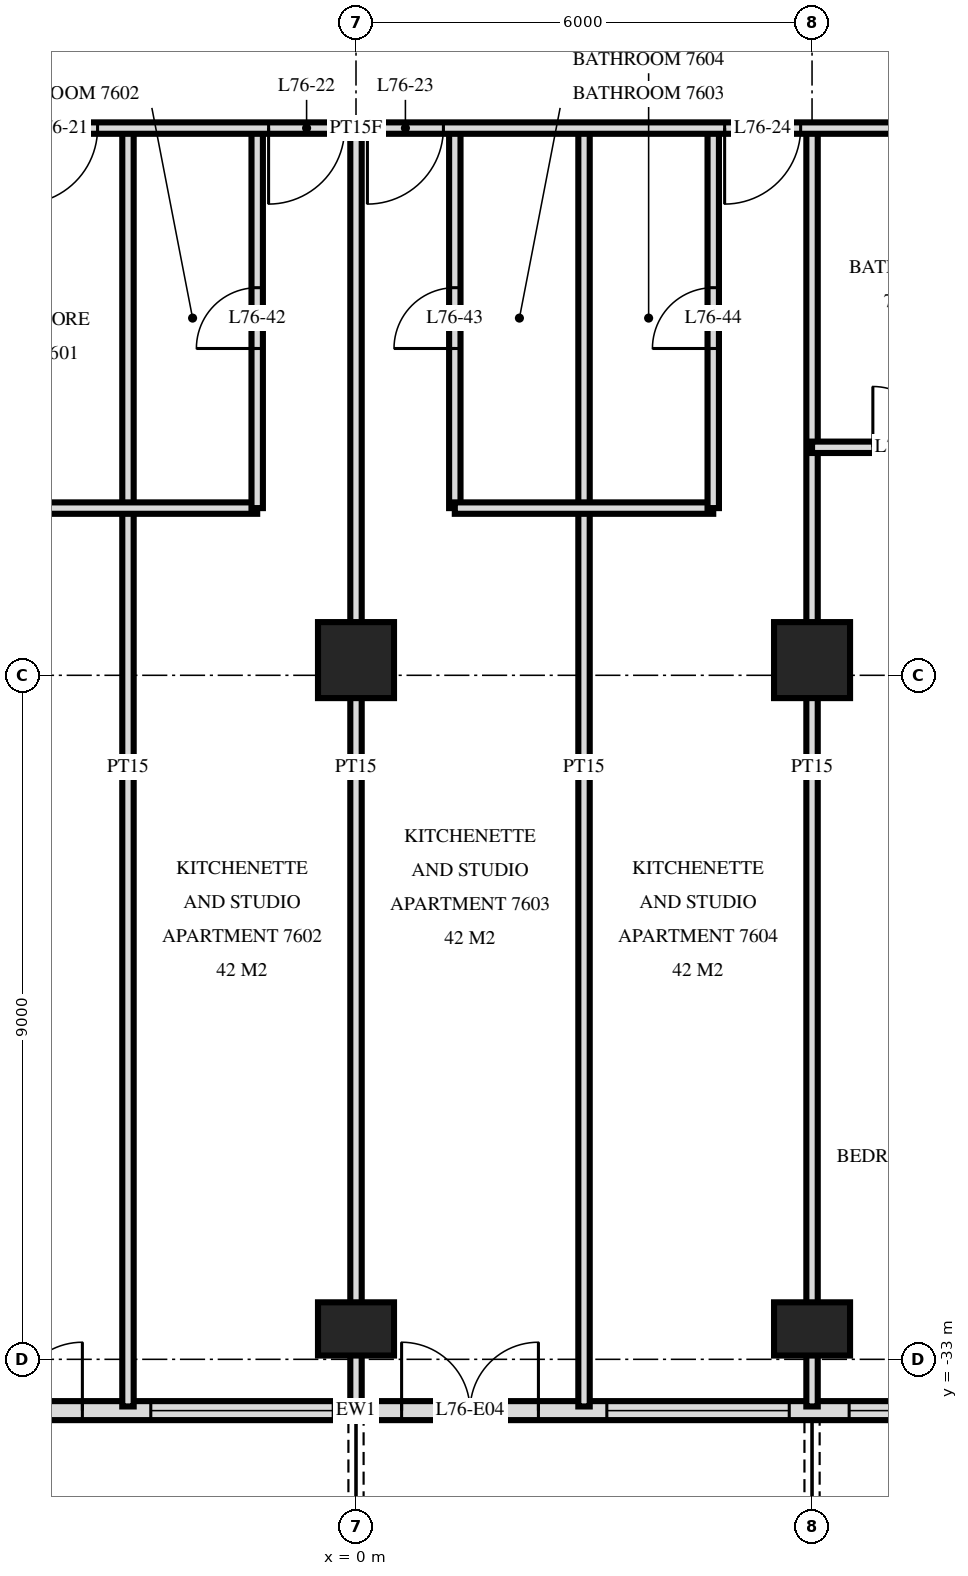
"""IFC4 building model, lengths in metres.
Left out: names, types, materials, properties, quantities, classifications, styles, units other than length and angle.
Written with IfcOpenShell. Run it as: python <this file> out.ifc"""

import sys

from ifc_helpers import new_model, si_unit, direction, frame, frame_2d, origin, origin_2d, place, context, subcontext, project, spatial, rectangle, extrude, element, fill, save


model = new_model("IFC4")
c1 = context("Model", 3, precision=1e-05, world=origin(), true_north=direction((0.0, 1.0)))
c2 = subcontext(c1, "Body", "Model", "MODEL_VIEW")
j1 = project(units=[si_unit("LENGTHUNIT", "METRE"), si_unit("PLANEANGLEUNIT", "RADIAN")], contexts=[c1])
p1 = place(None, origin())
s1 = spatial("IfcSite", under=j1, at=p1, CompositionType="ELEMENT")
p2 = place(p1, origin())
s2 = spatial("IfcBuilding", under=s1, at=p2, CompositionType="ELEMENT")
p3 = place(p2, frame((0.0, 0.0, 287.6)))
s3 = spatial("IfcBuildingStorey", under=s2, at=p3, CompositionType="ELEMENT", Elevation=287.6)
p4 = place(p3, frame((0.0, -32.6, 0.0), z_axis=(0.0, 0.0, 1.0), x_axis=(1.0, 0.0, 0.0)))
e1 = element("IfcColumn", 1, at=p4, inside=s3, PredefinedType="COLUMN", context=c2, shape_type="SweptSolid", body=[
    extrude(rectangle(XDim=1.0, YDim=0.7, at=origin_2d()), origin(), (0.0, 0.0, 1.0), 3.5),
])
p5 = place(p3, frame((0.0, -23.8, 0.0), z_axis=(0.0, 0.0, 1.0), x_axis=(1.0, 0.0, 0.0)))
e2 = element("IfcColumn", 2, at=p5, inside=s3, PredefinedType="COLUMN", context=c2, shape_type="SweptSolid", body=[
    extrude(rectangle(XDim=1.0, YDim=1.0, at=origin_2d()), origin(), (0.0, 0.0, 1.0), 3.5),
])
p6 = place(p3, frame((6.0, -32.6, 0.0), z_axis=(0.0, 0.0, 1.0), x_axis=(1.0, 0.0, 0.0)))
e3 = element("IfcColumn", 3, at=p6, inside=s3, PredefinedType="COLUMN", context=c2, shape_type="SweptSolid", body=[
    extrude(rectangle(XDim=1.0, YDim=0.7, at=origin_2d()), origin(), (0.0, 0.0, 1.0), 3.5),
])
p7 = place(p3, frame((6.0, -23.8, 0.0), z_axis=(0.0, 0.0, 1.0), x_axis=(1.0, 0.0, 0.0)))
e4 = element("IfcColumn", 4, at=p7, inside=s3, PredefinedType="COLUMN", context=c2, shape_type="SweptSolid", body=[
    extrude(rectangle(XDim=1.0, YDim=1.0, at=origin_2d()), origin(), (0.0, 0.0, 1.0), 3.5),
])
p8 = place(p3, frame((-18.575, -33.675, 0.0), z_axis=(0.0, 0.0, 1.0), x_axis=(1.0, 0.0, 0.0)))
e5 = element("IfcWall", 5, at=p8, inside=s3, PredefinedType="SOLIDWALL", context=c2, shape_type="SweptSolid", body=[
    extrude(rectangle(XDim=37.151, YDim=0.25, at=frame_2d((18.575, 0.0))), origin(), (0.0, 0.0, 1.0), 3.22),
])
p9 = place(p8, frame((1.175, 0.0, 0.0)))
e6 = element("IfcOpeningElement", 6, at=p9, cuts=e5, PredefinedType="OPENING", context=c2, shape_type="SweptSolid", body=[
    extrude(rectangle(XDim=1.8, YDim=2.4, at=frame_2d((0.9, 1.2))), frame((0.0, 0.135, 0.0), z_axis=(0.0, -1.0, 0.0), x_axis=(1.0, 0.0, 0.0)), (0.0, 0.0, 1.0), 0.27),
])
p10 = place(p8, frame((4.4, 0.0, 0.9)))
e7 = element("IfcOpeningElement", 7, at=p10, cuts=e5, PredefinedType="OPENING", context=c2, shape_type="SweptSolid", body=[
    extrude(rectangle(XDim=1.8, YDim=1.5, at=frame_2d((0.9, 0.75))), frame((0.0, 0.135, 0.0), z_axis=(0.0, -1.0, 0.0), x_axis=(1.0, 0.0, 0.0)), (0.0, 0.0, 1.0), 0.27),
])
p11 = place(p8, frame((6.875, 0.0, 0.9)))
e8 = element("IfcOpeningElement", 8, at=p11, cuts=e5, PredefinedType="OPENING", context=c2, shape_type="SweptSolid", body=[
    extrude(rectangle(XDim=2.4, YDim=1.5, at=frame_2d((1.2, 0.75))), frame((0.0, 0.135, 0.0), z_axis=(0.0, -1.0, 0.0), x_axis=(1.0, 0.0, 0.0)), (0.0, 0.0, 1.0), 0.27),
])
p12 = place(p8, frame((10.175, 0.0, 0.0)))
e9 = element("IfcOpeningElement", 9, at=p12, cuts=e5, PredefinedType="OPENING", context=c2, shape_type="SweptSolid", body=[
    extrude(rectangle(XDim=1.8, YDim=2.4, at=frame_2d((0.9, 1.2))), frame((0.0, 0.135, 0.0), z_axis=(0.0, -1.0, 0.0), x_axis=(1.0, 0.0, 0.0)), (0.0, 0.0, 1.0), 0.27),
])
p13 = place(p8, frame((13.175, 0.0, 0.0)))
e10 = element("IfcOpeningElement", 10, at=p13, cuts=e5, PredefinedType="OPENING", context=c2, shape_type="SweptSolid", body=[
    extrude(rectangle(XDim=1.8, YDim=2.4, at=frame_2d((0.9, 1.2))), frame((0.0, 0.135, 0.0), z_axis=(0.0, -1.0, 0.0), x_axis=(1.0, 0.0, 0.0)), (0.0, 0.0, 1.0), 0.27),
])
p14 = place(p8, frame((15.875, 0.0, 0.9)))
e11 = element("IfcOpeningElement", 11, at=p14, cuts=e5, PredefinedType="OPENING", context=c2, shape_type="SweptSolid", body=[
    extrude(rectangle(XDim=2.4, YDim=1.5, at=frame_2d((1.2, 0.75))), frame((0.0, 0.135, 0.0), z_axis=(0.0, -1.0, 0.0), x_axis=(1.0, 0.0, 0.0)), (0.0, 0.0, 1.0), 0.27),
])
p15 = place(p8, frame((19.175, 0.0, 0.0)))
e12 = element("IfcOpeningElement", 12, at=p15, cuts=e5, PredefinedType="OPENING", context=c2, shape_type="SweptSolid", body=[
    extrude(rectangle(XDim=1.8, YDim=2.4, at=frame_2d((0.9, 1.2))), frame((0.0, 0.135, 0.0), z_axis=(0.0, -1.0, 0.0), x_axis=(1.0, 0.0, 0.0)), (0.0, 0.0, 1.0), 0.27),
])
p16 = place(p8, frame((21.875, 0.0, 0.9)))
e13 = element("IfcOpeningElement", 13, at=p16, cuts=e5, PredefinedType="OPENING", context=c2, shape_type="SweptSolid", body=[
    extrude(rectangle(XDim=2.4, YDim=1.5, at=frame_2d((1.2, 0.75))), frame((0.0, 0.135, 0.0), z_axis=(0.0, -1.0, 0.0), x_axis=(1.0, 0.0, 0.0)), (0.0, 0.0, 1.0), 0.27),
])
p17 = place(p8, frame((25.063, 0.0, 0.9)))
e14 = element("IfcOpeningElement", 14, at=p17, cuts=e5, PredefinedType="OPENING", context=c2, shape_type="SweptSolid", body=[
    extrude(rectangle(XDim=1.8, YDim=1.5, at=frame_2d((0.9, 0.75))), frame((0.0, 0.135, 0.0), z_axis=(0.0, -1.0, 0.0), x_axis=(1.0, 0.0, 0.0)), (0.0, 0.0, 1.0), 0.27),
])
p18 = place(p8, frame((27.838, 0.0, 0.0)))
e15 = element("IfcOpeningElement", 15, at=p18, cuts=e5, PredefinedType="OPENING", context=c2, shape_type="SweptSolid", body=[
    extrude(rectangle(XDim=1.8, YDim=2.4, at=frame_2d((0.9, 1.2))), frame((0.0, 0.135, 0.0), z_axis=(0.0, -1.0, 0.0), x_axis=(1.0, 0.0, 0.0)), (0.0, 0.0, 1.0), 0.27),
])
p19 = place(p8, frame((31.175, 0.0, 0.0)))
e16 = element("IfcOpeningElement", 16, at=p19, cuts=e5, PredefinedType="OPENING", context=c2, shape_type="SweptSolid", body=[
    extrude(rectangle(XDim=1.8, YDim=2.4, at=frame_2d((0.9, 1.2))), frame((0.0, 0.135, 0.0), z_axis=(0.0, -1.0, 0.0), x_axis=(1.0, 0.0, 0.0)), (0.0, 0.0, 1.0), 0.27),
])
p20 = place(p3, frame((6.0, -33.62, 0.0), z_axis=(0.0, 0.0, 1.0), x_axis=(0.0, 1.0, 0.0)))
e17 = element("IfcWall", 17, at=p20, inside=s3, PredefinedType="PARTITIONING", context=c2, shape_type="SweptSolid", body=[
    extrude(rectangle(XDim=16.82, YDim=0.15, at=frame_2d((8.41, 0.0))), origin(), (0.0, 0.0, 1.0), 3.22),
])
p21 = place(p3, frame((4.7, -21.8, 0.0), z_axis=(0.0, 0.0, 1.0), x_axis=(0.0, 1.0, 0.0)))
e18 = element("IfcWall", 18, at=p21, inside=s3, PredefinedType="PARTITIONING", context=c2, shape_type="SweptSolid", body=[
    extrude(rectangle(XDim=5.0, YDim=0.15, at=frame_2d((2.5, 0.0))), origin(), (0.0, 0.0, 1.0), 3.22),
])
p22 = place(p21, frame((2.1, 0.0, 0.0)))
e19 = element("IfcOpeningElement", 19, at=p22, cuts=e18, PredefinedType="OPENING", context=c2, shape_type="SweptSolid", body=[
    extrude(rectangle(XDim=0.8, YDim=2.1, at=frame_2d((0.4, 1.05))), frame((0.0, 0.085, 0.0), z_axis=(0.0, -1.0, 0.0), x_axis=(1.0, 0.0, 0.0)), (0.0, 0.0, 1.0), 0.17),
])
p23 = place(p3, frame((3.0, -33.62, 0.0), z_axis=(0.0, 0.0, 1.0), x_axis=(0.0, 1.0, 0.0)))
e20 = element("IfcWall", 20, at=p23, inside=s3, PredefinedType="PARTITIONING", context=c2, shape_type="SweptSolid", body=[
    extrude(rectangle(XDim=16.82, YDim=0.15, at=frame_2d((8.41, 0.0))), origin(), (0.0, 0.0, 1.0), 3.22),
])
p24 = place(p3, frame((1.3, -21.8, 0.0), z_axis=(0.0, 0.0, 1.0), x_axis=(0.0, 1.0, 0.0)))
e21 = element("IfcWall", 21, at=p24, inside=s3, PredefinedType="PARTITIONING", context=c2, shape_type="SweptSolid", body=[
    extrude(rectangle(XDim=5.0, YDim=0.15, at=frame_2d((2.5, 0.0))), origin(), (0.0, 0.0, 1.0), 3.22),
])
p25 = place(p24, frame((2.1, 0.0, 0.0)))
e22 = element("IfcOpeningElement", 22, at=p25, cuts=e21, PredefinedType="OPENING", context=c2, shape_type="SweptSolid", body=[
    extrude(rectangle(XDim=0.8, YDim=2.1, at=frame_2d((0.4, 1.05))), frame((0.0, 0.085, 0.0), z_axis=(0.0, -1.0, 0.0), x_axis=(1.0, 0.0, 0.0)), (0.0, 0.0, 1.0), 0.17),
])
p26 = place(p3, frame((0.0, -33.62, 0.0), z_axis=(0.0, 0.0, 1.0), x_axis=(0.0, 1.0, 0.0)))
e23 = element("IfcWall", 23, at=p26, inside=s3, PredefinedType="PARTITIONING", context=c2, shape_type="SweptSolid", body=[
    extrude(rectangle(XDim=16.82, YDim=0.15, at=frame_2d((8.41, 0.0))), origin(), (0.0, 0.0, 1.0), 3.22),
])
p27 = place(p3, frame((-1.3, -21.8, 0.0), z_axis=(0.0, 0.0, 1.0), x_axis=(0.0, 1.0, 0.0)))
e24 = element("IfcWall", 24, at=p27, inside=s3, PredefinedType="PARTITIONING", context=c2, shape_type="SweptSolid", body=[
    extrude(rectangle(XDim=5.0, YDim=0.15, at=frame_2d((2.5, 0.0))), origin(), (0.0, 0.0, 1.0), 3.22),
])
p28 = place(p27, frame((2.1, 0.0, 0.0)))
e25 = element("IfcOpeningElement", 25, at=p28, cuts=e24, PredefinedType="OPENING", context=c2, shape_type="SweptSolid", body=[
    extrude(rectangle(XDim=0.8, YDim=2.1, at=frame_2d((0.4, 1.05))), frame((0.0, 0.085, 0.0), z_axis=(0.0, -1.0, 0.0), x_axis=(1.0, 0.0, 0.0)), (0.0, 0.0, 1.0), 0.17),
])
p29 = place(p3, frame((-3.0, -33.62, 0.0), z_axis=(0.0, 0.0, 1.0), x_axis=(0.0, 1.0, 0.0)))
e26 = element("IfcWall", 26, at=p29, inside=s3, PredefinedType="PARTITIONING", context=c2, shape_type="SweptSolid", body=[
    extrude(rectangle(XDim=16.82, YDim=0.15, at=frame_2d((8.41, 0.0))), origin(), (0.0, 0.0, 1.0), 3.22),
])
p30 = place(p3, frame((-4.8, -21.8, 0.0), z_axis=(0.0, 0.0, 1.0), x_axis=(1.0, 0.0, 0.0)))
e27 = element("IfcWall", 27, at=p30, inside=s3, PredefinedType="PARTITIONING", context=c2, shape_type="SweptSolid", body=[
    extrude(rectangle(XDim=3.5, YDim=0.15, at=frame_2d((1.75, 0.0))), origin(), (0.0, 0.0, 1.0), 3.22),
])
p31 = place(p3, frame((1.3, -21.8, 0.0), z_axis=(0.0, 0.0, 1.0), x_axis=(1.0, 0.0, 0.0)))
e28 = element("IfcWall", 28, at=p31, inside=s3, PredefinedType="PARTITIONING", context=c2, shape_type="SweptSolid", body=[
    extrude(rectangle(XDim=3.4, YDim=0.15, at=frame_2d((1.7, 0.0))), origin(), (0.0, 0.0, 1.0), 3.22),
])
p32 = place(p3, frame((6.0, -21.0, 0.0), z_axis=(0.0, 0.0, 1.0), x_axis=(1.0, 0.0, 0.0)))
e29 = element("IfcWall", 29, at=p32, inside=s3, PredefinedType="PARTITIONING", context=c2, shape_type="SweptSolid", body=[
    extrude(rectangle(XDim=6.0, YDim=0.15, at=frame_2d((3.0, 0.0))), origin(), (0.0, 0.0, 1.0), 3.22),
])
p33 = place(p32, frame((0.8, 0.0, 0.0)))
e30 = element("IfcOpeningElement", 30, at=p33, cuts=e29, PredefinedType="OPENING", context=c2, shape_type="SweptSolid", body=[
    extrude(rectangle(XDim=0.8, YDim=2.1, at=frame_2d((0.4, 1.05))), frame((0.0, 0.085, 0.0), z_axis=(0.0, -1.0, 0.0), x_axis=(1.0, 0.0, 0.0)), (0.0, 0.0, 1.0), 0.17),
])
p34 = place(p3, frame((-22.92, -16.8, 0.0), z_axis=(0.0, 0.0, 1.0), x_axis=(1.0, 0.0, 0.0)))
e31 = element("IfcWall", 31, at=p34, inside=s3, PredefinedType="PARTITIONING", context=c2, shape_type="SweptSolid", body=[
    extrude(rectangle(XDim=45.84, YDim=0.15, at=frame_2d((22.92, 0.0))), origin(), (0.0, 0.0, 1.0), 3.22),
])
p35 = place(p34, frame((16.72, 0.0, 0.0)))
e32 = element("IfcOpeningElement", 32, at=p35, cuts=e31, PredefinedType="OPENING", context=c2, shape_type="SweptSolid", body=[
    extrude(rectangle(XDim=1.0, YDim=2.1, at=frame_2d((0.5, 1.05))), frame((0.0, 0.085, 0.0), z_axis=(0.0, -1.0, 0.0), x_axis=(1.0, 0.0, 0.0)), (0.0, 0.0, 1.0), 0.17),
])
p36 = place(p34, frame((18.52, 0.0, 0.0)))
e33 = element("IfcOpeningElement", 33, at=p36, cuts=e31, PredefinedType="OPENING", context=c2, shape_type="SweptSolid", body=[
    extrude(rectangle(XDim=1.0, YDim=2.1, at=frame_2d((0.5, 1.05))), frame((0.0, 0.085, 0.0), z_axis=(0.0, -1.0, 0.0), x_axis=(1.0, 0.0, 0.0)), (0.0, 0.0, 1.0), 0.17),
])
p37 = place(p34, frame((21.77, 0.0, 0.0)))
e34 = element("IfcOpeningElement", 34, at=p37, cuts=e31, PredefinedType="OPENING", context=c2, shape_type="SweptSolid", body=[
    extrude(rectangle(XDim=1.0, YDim=2.1, at=frame_2d((0.5, 1.05))), frame((0.0, 0.085, 0.0), z_axis=(0.0, -1.0, 0.0), x_axis=(1.0, 0.0, 0.0)), (0.0, 0.0, 1.0), 0.17),
])
p38 = place(p34, frame((23.07, 0.0, 0.0)))
e35 = element("IfcOpeningElement", 35, at=p38, cuts=e31, PredefinedType="OPENING", context=c2, shape_type="SweptSolid", body=[
    extrude(rectangle(XDim=1.0, YDim=2.1, at=frame_2d((0.5, 1.05))), frame((0.0, 0.085, 0.0), z_axis=(0.0, -1.0, 0.0), x_axis=(1.0, 0.0, 0.0)), (0.0, 0.0, 1.0), 0.17),
])
p39 = place(p34, frame((27.77, 0.0, 0.0)))
e36 = element("IfcOpeningElement", 36, at=p39, cuts=e31, PredefinedType="OPENING", context=c2, shape_type="SweptSolid", body=[
    extrude(rectangle(XDim=1.0, YDim=2.1, at=frame_2d((0.5, 1.05))), frame((0.0, 0.085, 0.0), z_axis=(0.0, -1.0, 0.0), x_axis=(1.0, 0.0, 0.0)), (0.0, 0.0, 1.0), 0.17),
])
p40 = place(p34, frame((7.02, 0.0, 0.0)))
e37 = element("IfcOpeningElement", 37, at=p40, cuts=e31, PredefinedType="OPENING", context=c2, shape_type="SweptSolid", body=[
    extrude(rectangle(XDim=1.0, YDim=2.1, at=frame_2d((0.5, 1.05))), frame((0.0, 0.085, 0.0), z_axis=(0.0, -1.0, 0.0), x_axis=(1.0, 0.0, 0.0)), (0.0, 0.0, 1.0), 0.17),
])
p41 = place(p34, frame((35.42, 0.0, 0.0)))
e38 = element("IfcOpeningElement", 38, at=p41, cuts=e31, PredefinedType="OPENING", context=c2, shape_type="SweptSolid", body=[
    extrude(rectangle(XDim=1.0, YDim=2.1, at=frame_2d((0.5, 1.05))), frame((0.0, 0.085, 0.0), z_axis=(0.0, -1.0, 0.0), x_axis=(1.0, 0.0, 0.0)), (0.0, 0.0, 1.0), 0.17),
])
p42 = place(p34, frame((42.19, 0.0, 0.0)))
e39 = element("IfcOpeningElement", 39, at=p42, cuts=e31, PredefinedType="OPENING", context=c2, shape_type="SweptSolid", body=[
    extrude(rectangle(XDim=1.0, YDim=2.1, at=frame_2d((0.5, 1.05))), frame((0.0, 0.085, 0.0), z_axis=(0.0, -1.0, 0.0), x_axis=(1.0, 0.0, 0.0)), (0.0, 0.0, 1.0), 0.17),
])
p43 = place(p13, origin())
e40 = element("IfcDoor", 40, at=p43, inside=s3, OperationType="DOUBLE_DOOR_SINGLE_SWING", PredefinedType="DOOR", context=c2, shape_type="SweptSolid", body=[
    extrude(rectangle(XDim=1.8, YDim=2.4, at=frame_2d((0.9, 1.2))), frame((0.0, 0.025, 0.0), z_axis=(0.0, -1.0, 0.0), x_axis=(1.0, 0.0, 0.0)), (0.0, 0.0, 1.0), 0.05),
])
fill(e10, e40)
p44 = place(p14, origin())
e41 = element("IfcWindow", 41, at=p44, inside=s3, PartitioningType="SINGLE_PANEL", PredefinedType="WINDOW", context=c2, shape_type="SweptSolid", body=[
    extrude(rectangle(XDim=2.4, YDim=1.5, at=frame_2d((1.2, 0.75))), frame((0.0, 0.03, 0.0), z_axis=(0.0, -1.0, 0.0), x_axis=(1.0, 0.0, 0.0)), (0.0, 0.0, 1.0), 0.06),
])
fill(e11, e41)
p45 = place(p15, origin())
e42 = element("IfcDoor", 42, at=p45, inside=s3, OperationType="DOUBLE_DOOR_SINGLE_SWING", PredefinedType="DOOR", context=c2, shape_type="SweptSolid", body=[
    extrude(rectangle(XDim=1.8, YDim=2.4, at=frame_2d((0.9, 1.2))), frame((0.0, 0.025, 0.0), z_axis=(0.0, -1.0, 0.0), x_axis=(1.0, 0.0, 0.0)), (0.0, 0.0, 1.0), 0.05),
])
fill(e12, e42)
p46 = place(p16, origin())
e43 = element("IfcWindow", 43, at=p46, inside=s3, PartitioningType="SINGLE_PANEL", PredefinedType="WINDOW", context=c2, shape_type="SweptSolid", body=[
    extrude(rectangle(XDim=2.4, YDim=1.5, at=frame_2d((1.2, 0.75))), frame((0.0, 0.03, 0.0), z_axis=(0.0, -1.0, 0.0), x_axis=(1.0, 0.0, 0.0)), (0.0, 0.0, 1.0), 0.06),
])
fill(e13, e43)
p47 = place(p17, origin())
e44 = element("IfcWindow", 44, at=p47, inside=s3, PartitioningType="SINGLE_PANEL", PredefinedType="WINDOW", context=c2, shape_type="SweptSolid", body=[
    extrude(rectangle(XDim=1.8, YDim=1.5, at=frame_2d((0.9, 0.75))), frame((0.0, 0.03, 0.0), z_axis=(0.0, -1.0, 0.0), x_axis=(1.0, 0.0, 0.0)), (0.0, 0.0, 1.0), 0.06),
])
fill(e14, e44)
p48 = place(p36, frame((0.5, 0.0, 0.0), z_axis=(0.0, 0.0, 1.0), x_axis=(-1.0, 0.0, 0.0)))
e45 = element("IfcDoor", 45, at=p48, inside=s3, OperationType="SINGLE_SWING_LEFT", PredefinedType="DOOR", context=c2, shape_type="SweptSolid", body=[
    extrude(rectangle(XDim=1.0, YDim=2.1, at=frame_2d((0.0, 1.05))), frame((0.0, -0.025, 0.0), z_axis=(0.0, 1.0, 0.0), x_axis=(-1.0, 0.0, 0.0)), (0.0, 0.0, 1.0), 0.05),
])
fill(e33, e45)
p49 = place(p37, frame((0.5, 0.0, 0.0), z_axis=(0.0, 0.0, 1.0), x_axis=(-1.0, 0.0, 0.0)))
e46 = element("IfcDoor", 46, at=p49, inside=s3, OperationType="SINGLE_SWING_LEFT", PredefinedType="DOOR", context=c2, shape_type="SweptSolid", body=[
    extrude(rectangle(XDim=1.0, YDim=2.1, at=frame_2d((0.0, 1.05))), frame((0.0, -0.025, 0.0), z_axis=(0.0, 1.0, 0.0), x_axis=(-1.0, 0.0, 0.0)), (0.0, 0.0, 1.0), 0.05),
])
fill(e34, e46)
p50 = place(p38, frame((0.5, 0.0, 0.0), z_axis=(0.0, 0.0, 1.0), x_axis=(-1.0, 0.0, 0.0)))
e47 = element("IfcDoor", 47, at=p50, inside=s3, OperationType="SINGLE_SWING_LEFT", PredefinedType="DOOR", context=c2, shape_type="SweptSolid", body=[
    extrude(rectangle(XDim=1.0, YDim=2.1, at=frame_2d((0.0, 1.05))), frame((0.0, -0.025, 0.0), z_axis=(0.0, 1.0, 0.0), x_axis=(-1.0, 0.0, 0.0)), (0.0, 0.0, 1.0), 0.05),
])
fill(e35, e47)
p51 = place(p39, frame((0.5, 0.0, 0.0), z_axis=(0.0, 0.0, 1.0), x_axis=(-1.0, 0.0, 0.0)))
e48 = element("IfcDoor", 48, at=p51, inside=s3, OperationType="SINGLE_SWING_LEFT", PredefinedType="DOOR", context=c2, shape_type="SweptSolid", body=[
    extrude(rectangle(XDim=1.0, YDim=2.1, at=frame_2d((0.0, 1.05))), frame((0.0, -0.025, 0.0), z_axis=(0.0, 1.0, 0.0), x_axis=(-1.0, 0.0, 0.0)), (0.0, 0.0, 1.0), 0.05),
])
fill(e36, e48)
p52 = place(p28, origin())
e49 = element("IfcDoor", 49, at=p52, inside=s3, OperationType="SINGLE_SWING_RIGHT", PredefinedType="DOOR", context=c2, shape_type="SweptSolid", body=[
    extrude(rectangle(XDim=0.8, YDim=2.1, at=frame_2d((0.4, 1.05))), frame((0.0, 0.025, 0.0), z_axis=(0.0, -1.0, 0.0), x_axis=(1.0, 0.0, 0.0)), (0.0, 0.0, 1.0), 0.05),
])
fill(e25, e49)
p53 = place(p25, origin())
e50 = element("IfcDoor", 50, at=p53, inside=s3, OperationType="SINGLE_SWING_RIGHT", PredefinedType="DOOR", context=c2, shape_type="SweptSolid", body=[
    extrude(rectangle(XDim=0.8, YDim=2.1, at=frame_2d((0.4, 1.05))), frame((0.0, 0.025, 0.0), z_axis=(0.0, -1.0, 0.0), x_axis=(1.0, 0.0, 0.0)), (0.0, 0.0, 1.0), 0.05),
])
fill(e22, e50)
p54 = place(p22, origin())
e51 = element("IfcDoor", 51, at=p54, inside=s3, OperationType="SINGLE_SWING_RIGHT", PredefinedType="DOOR", context=c2, shape_type="SweptSolid", body=[
    extrude(rectangle(XDim=0.8, YDim=2.1, at=frame_2d((0.4, 1.05))), frame((0.0, 0.025, 0.0), z_axis=(0.0, -1.0, 0.0), x_axis=(1.0, 0.0, 0.0)), (0.0, 0.0, 1.0), 0.05),
])
fill(e19, e51)
p55 = place(p33, origin())
e52 = element("IfcDoor", 52, at=p55, inside=s3, OperationType="SINGLE_SWING_RIGHT", PredefinedType="DOOR", context=c2, shape_type="SweptSolid", body=[
    extrude(rectangle(XDim=0.8, YDim=2.1, at=frame_2d((0.4, 1.05))), frame((0.0, 0.025, 0.0), z_axis=(0.0, -1.0, 0.0), x_axis=(1.0, 0.0, 0.0)), (0.0, 0.0, 1.0), 0.05),
])
fill(e30, e52)
save(model, sys.argv[1])
